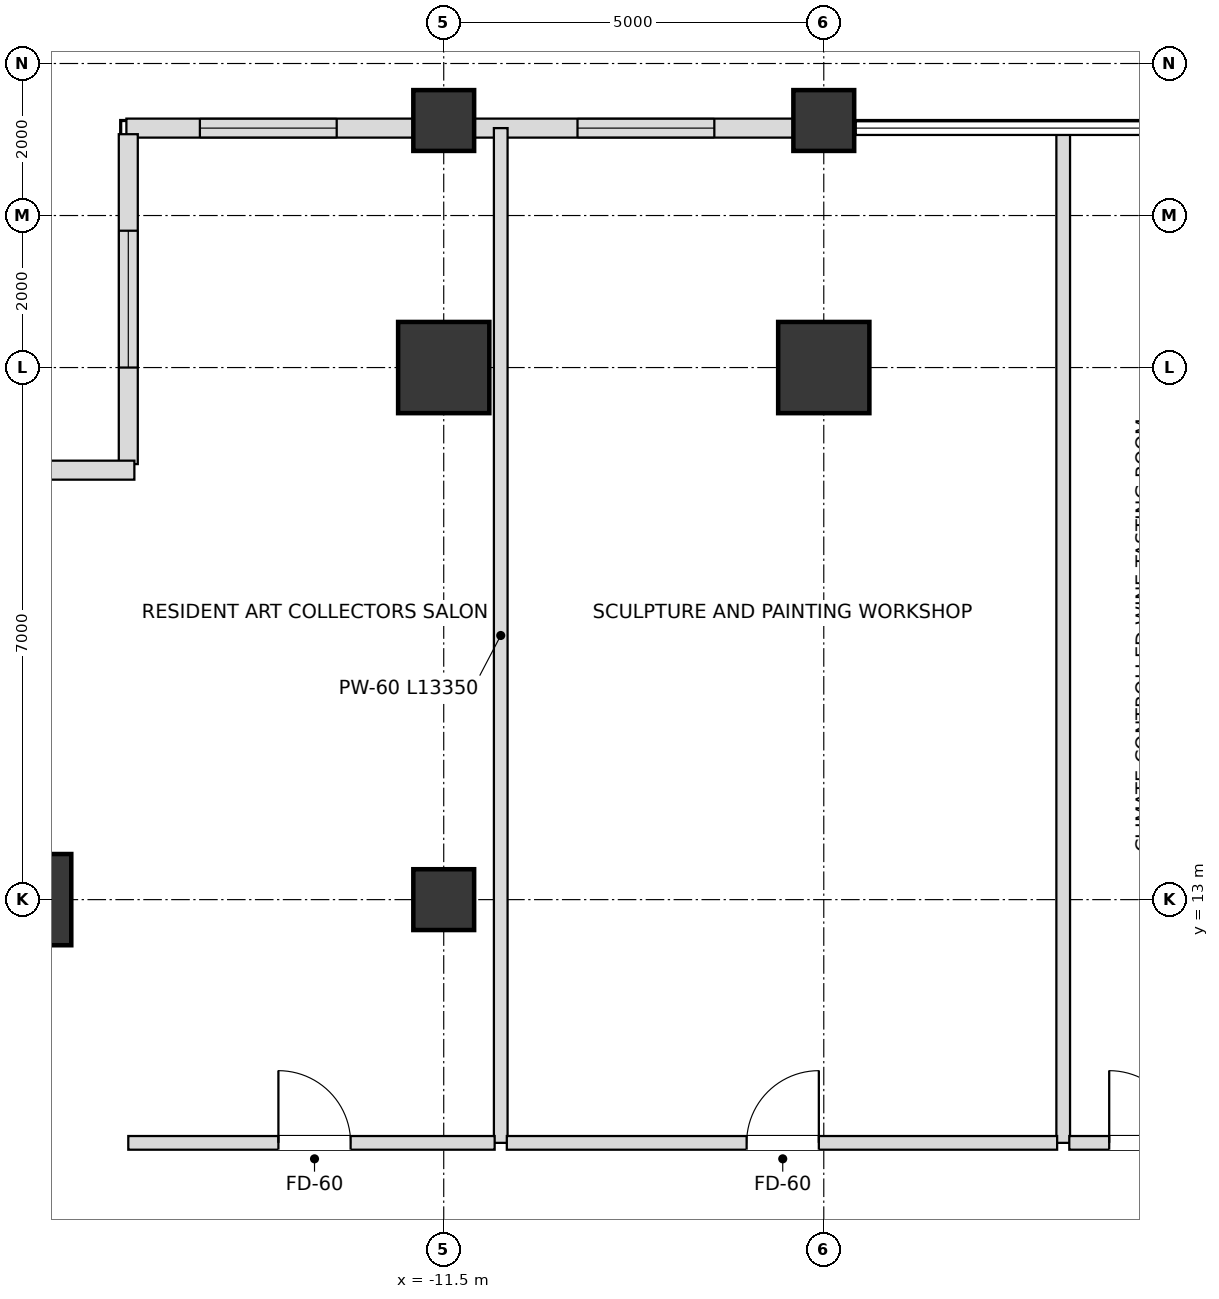
"""IFC4 building model, lengths in metres.
Left out: names, types, materials, properties, quantities, classifications, styles, units other than length and angle.
Written with IfcOpenShell. Run it as: python <this file> out.ifc"""

import sys

from ifc_helpers import new_model, si_unit, direction, frame, frame_2d, origin, origin_2d, place, context, subcontext, project, spatial, rectangle, extrude, element, fill, save


model = new_model("IFC4")
c1 = context("Model", 3, precision=1e-05, world=origin(), true_north=direction((0.0, 1.0)))
c2 = subcontext(c1, "Body", "Model", "MODEL_VIEW")
j1 = project(units=[si_unit("LENGTHUNIT", "METRE"), si_unit("PLANEANGLEUNIT", "RADIAN")], contexts=[c1])
p1 = place(None, origin())
s1 = spatial("IfcSite", under=j1, at=p1, CompositionType="ELEMENT")
p2 = place(p1, origin())
s2 = spatial("IfcBuilding", under=s1, at=p2, CompositionType="ELEMENT")
p3 = place(p2, frame((0.0, 0.0, 158.4)))
s3 = spatial("IfcBuildingStorey", under=s2, at=p3, CompositionType="ELEMENT", Elevation=158.4)
for number, where, z_axis, x_axis in (
    (1, (-6.5, 20.0, 0.0), (0.0, 0.0, 1.0), (1.0, 0.0, 0.0)),
    (2, (-11.5, 20.0, 0.0), (0.0, 0.0, 1.0), (1.0, 0.0, 0.0)),
    (3, (-17.0, 13.0, 0.0), (0.0, 0.0, 1.0), (1.0, 0.0, 0.0)),
):
    element("IfcColumn", number, at=place(p3, frame(where, z_axis=z_axis, x_axis=x_axis)), inside=s3, PredefinedType="USERDEFINED", context=c2, shape_type="SweptSolid", body=[
        extrude(rectangle(XDim=1.2, YDim=1.2, at=origin_2d()), origin(), (0.0, 0.0, 1.0), 3.6),
    ])
for number, where, z_axis, x_axis in (
    (4, (-11.5, 13.0, 0.0), (0.0, 0.0, 1.0), (1.0, 0.0, 0.0)),
    (5, (-11.5, 23.25, 0.0), (0.0, 0.0, 1.0), (1.0, 0.0, 0.0)),
    (6, (-6.5, 23.25, 0.0), (0.0, 0.0, 1.0), (1.0, 0.0, 0.0)),
):
    element("IfcColumn", number, at=place(p3, frame(where, z_axis=z_axis, x_axis=x_axis)), inside=s3, PredefinedType="COLUMN", context=c2, shape_type="SweptSolid", body=[
        extrude(rectangle(XDim=0.8, YDim=0.8, at=origin_2d()), origin(), (0.0, 0.0, 1.0), 3.6),
    ])
p4 = place(p3, frame((-6.895, 23.15, 0.0), z_axis=(0.0, 0.0, 1.0), x_axis=(-1.0, 0.0, 0.0)))
e7 = element("IfcWall", 7, at=p4, inside=s3, PredefinedType="SOLIDWALL", context=c2, shape_type="SweptSolid", body=[
    extrude(rectangle(XDim=4.21, YDim=0.25, at=frame_2d((2.105, 0.0))), origin(), (0.0, 0.0, 1.0), 2.736),
])
p5 = place(p4, frame((1.045, 0.0, 0.72)))
e8 = element("IfcOpeningElement", 8, at=p5, cuts=e7, PredefinedType="OPENING", context=c2, shape_type="SweptSolid", body=[
    extrude(rectangle(XDim=1.8, YDim=1.68, at=frame_2d((0.9, 0.84))), frame((0.0, 0.135, 0.0), z_axis=(0.0, -1.0, 0.0), x_axis=(1.0, 0.0, 0.0)), (0.0, 0.0, 1.0), 0.27),
])
p6 = place(p3, frame((-11.895, 23.15, 0.0), z_axis=(0.0, 0.0, 1.0), x_axis=(-1.0, 0.0, 0.0)))
e9 = element("IfcWall", 9, at=p6, inside=s3, PredefinedType="SOLIDWALL", context=c2, shape_type="SweptSolid", body=[
    extrude(rectangle(XDim=3.78, YDim=0.25, at=frame_2d((1.89, 0.0))), origin(), (0.0, 0.0, 1.0), 2.736),
])
p7 = place(p6, frame((1.013, 0.0, 0.72)))
e10 = element("IfcOpeningElement", 10, at=p7, cuts=e9, PredefinedType="OPENING", context=c2, shape_type="SweptSolid", body=[
    extrude(rectangle(XDim=1.8, YDim=1.68, at=frame_2d((0.9, 0.84))), frame((0.0, 0.135, 0.0), z_axis=(0.0, -1.0, 0.0), x_axis=(1.0, 0.0, 0.0)), (0.0, 0.0, 1.0), 0.27),
])
p8 = place(p3, frame((-15.65, 23.07, 0.0), z_axis=(0.0, 0.0, 1.0), x_axis=(0.0, -1.0, 0.0)))
e11 = element("IfcWall", 11, at=p8, inside=s3, PredefinedType="SOLIDWALL", context=c2, shape_type="SweptSolid", body=[
    extrude(rectangle(XDim=4.34, YDim=0.25, at=frame_2d((2.17, 0.0))), origin(), (0.0, 0.0, 1.0), 2.736),
])
p9 = place(p8, frame((1.27, 0.0, 0.72)))
e12 = element("IfcOpeningElement", 12, at=p9, cuts=e11, PredefinedType="OPENING", context=c2, shape_type="SweptSolid", body=[
    extrude(rectangle(XDim=1.8, YDim=1.68, at=frame_2d((0.9, 0.84))), frame((0.0, 0.135, 0.0), z_axis=(0.0, -1.0, 0.0), x_axis=(1.0, 0.0, 0.0)), (0.0, 0.0, 1.0), 0.27),
])
p10 = place(p3, frame((-15.57, 18.65, 0.0), z_axis=(0.0, 0.0, 1.0), x_axis=(-1.0, 0.0, 0.0)))
e13 = element("IfcWall", 13, at=p10, inside=s3, PredefinedType="SOLIDWALL", context=c2, shape_type="SweptSolid", body=[
    extrude(rectangle(XDim=4.66, YDim=0.25, at=frame_2d((2.33, 0.0))), origin(), (0.0, 0.0, 1.0), 2.736),
])
p11 = place(p10, frame((1.43, 0.0, 0.72)))
e14 = element("IfcOpeningElement", 14, at=p11, cuts=e13, PredefinedType="OPENING", context=c2, shape_type="SweptSolid", body=[
    extrude(rectangle(XDim=1.8, YDim=1.68, at=frame_2d((0.9, 0.84))), frame((0.0, 0.135, 0.0), z_axis=(0.0, -1.0, 0.0), x_axis=(1.0, 0.0, 0.0)), (0.0, 0.0, 1.0), 0.27),
])
for number, where, z_axis, x_axis in (
    (15, (-10.75, 9.8, 0.0), (0.0, 0.0, 1.0), (0.0, 1.0, 0.0)),
    (16, (-3.35, 9.8, 0.0), (0.0, 0.0, 1.0), (0.0, 1.0, 0.0)),
):
    element("IfcWall", number, at=place(p3, frame(where, z_axis=z_axis, x_axis=x_axis)), inside=s3, PredefinedType="PARTITIONING", context=c2, shape_type="SweptSolid", body=[
        extrude(rectangle(XDim=13.35, YDim=0.18, at=frame_2d((6.675, 0.0))), origin(), (0.0, 0.0, 1.0), 2.816),
    ])
p12 = place(p3, frame((-15.65, 9.8, 0.0), z_axis=(0.0, 0.0, 1.0), x_axis=(1.0, 0.0, 0.0)))
e17 = element("IfcWall", 17, at=p12, inside=s3, PredefinedType="PARTITIONING", context=c2, shape_type="SweptSolid", body=[
    extrude(rectangle(XDim=4.82, YDim=0.18, at=frame_2d((2.41, 0.0))), origin(), (0.0, 0.0, 1.0), 3.38),
])
p13 = place(p12, frame((1.975, 0.0, 0.0)))
e18 = element("IfcOpeningElement", 18, at=p13, cuts=e17, PredefinedType="OPENING", context=c2, shape_type="SweptSolid", body=[
    extrude(rectangle(XDim=0.95, YDim=2.15, at=frame_2d((0.475, 1.075))), frame((0.0, 0.1, 0.0), z_axis=(0.0, -1.0, 0.0), x_axis=(1.0, 0.0, 0.0)), (0.0, 0.0, 1.0), 0.2),
])
p14 = place(p3, frame((-10.67, 9.8, 0.0), z_axis=(0.0, 0.0, 1.0), x_axis=(1.0, 0.0, 0.0)))
e19 = element("IfcWall", 19, at=p14, inside=s3, PredefinedType="PARTITIONING", context=c2, shape_type="SweptSolid", body=[
    extrude(rectangle(XDim=7.24, YDim=0.18, at=frame_2d((3.62, 0.0))), origin(), (0.0, 0.0, 1.0), 2.816),
])
p15 = place(p14, frame((3.155, 0.0, 0.0)))
e20 = element("IfcOpeningElement", 20, at=p15, cuts=e19, PredefinedType="OPENING", context=c2, shape_type="SweptSolid", body=[
    extrude(rectangle(XDim=0.95, YDim=2.15, at=frame_2d((0.475, 1.075))), frame((0.0, 0.1, 0.0), z_axis=(0.0, -1.0, 0.0), x_axis=(1.0, 0.0, 0.0)), (0.0, 0.0, 1.0), 0.2),
])
p16 = place(p3, frame((-3.27, 9.8, 0.0), z_axis=(0.0, 0.0, 1.0), x_axis=(1.0, 0.0, 0.0)))
e21 = element("IfcWall", 21, at=p16, inside=s3, PredefinedType="PARTITIONING", context=c2, shape_type="SweptSolid", body=[
    extrude(rectangle(XDim=1.99, YDim=0.18, at=frame_2d((0.995, 0.0))), origin(), (0.0, 0.0, 1.0), 3.38),
])
p17 = place(p16, frame((0.525, 0.0, 0.0)))
e22 = element("IfcOpeningElement", 22, at=p17, cuts=e21, PredefinedType="OPENING", context=c2, shape_type="SweptSolid", body=[
    extrude(rectangle(XDim=0.95, YDim=2.15, at=frame_2d((0.475, 1.075))), frame((0.0, 0.1, 0.0), z_axis=(0.0, -1.0, 0.0), x_axis=(1.0, 0.0, 0.0)), (0.0, 0.0, 1.0), 0.2),
])
p18 = place(p5, origin())
e23 = element("IfcWindow", 23, at=p18, inside=s3, PartitioningType="SINGLE_PANEL", PredefinedType="WINDOW", context=c2, shape_type="SweptSolid", body=[
    extrude(rectangle(XDim=1.8, YDim=1.68, at=frame_2d((0.9, 0.84))), frame((0.0, 0.03, 0.0), z_axis=(0.0, -1.0, 0.0), x_axis=(1.0, 0.0, 0.0)), (0.0, 0.0, 1.0), 0.06),
])
fill(e8, e23)
p19 = place(p7, origin())
e24 = element("IfcWindow", 24, at=p19, inside=s3, PartitioningType="SINGLE_PANEL", PredefinedType="WINDOW", context=c2, shape_type="SweptSolid", body=[
    extrude(rectangle(XDim=1.8, YDim=1.68, at=frame_2d((0.9, 0.84))), frame((0.0, 0.03, 0.0), z_axis=(0.0, -1.0, 0.0), x_axis=(1.0, 0.0, 0.0)), (0.0, 0.0, 1.0), 0.06),
])
fill(e10, e24)
p20 = place(p9, origin())
e25 = element("IfcWindow", 25, at=p20, inside=s3, PartitioningType="SINGLE_PANEL", PredefinedType="WINDOW", context=c2, shape_type="SweptSolid", body=[
    extrude(rectangle(XDim=1.8, YDim=1.68, at=frame_2d((0.9, 0.84))), frame((0.0, 0.03, 0.0), z_axis=(0.0, -1.0, 0.0), x_axis=(1.0, 0.0, 0.0)), (0.0, 0.0, 1.0), 0.06),
])
fill(e12, e25)
p21 = place(p13, origin())
e26 = element("IfcDoor", 26, at=p21, inside=s3, OperationType="SINGLE_SWING_LEFT", PredefinedType="DOOR", context=c2, shape_type="SweptSolid", body=[
    extrude(rectangle(XDim=0.95, YDim=2.15, at=frame_2d((0.475, 1.075))), frame((0.0, 0.025, 0.0), z_axis=(0.0, -1.0, 0.0), x_axis=(1.0, 0.0, 0.0)), (0.0, 0.0, 1.0), 0.05),
])
fill(e18, e26)
p22 = place(p15, origin())
e27 = element("IfcDoor", 27, at=p22, inside=s3, OperationType="SINGLE_SWING_RIGHT", PredefinedType="DOOR", context=c2, shape_type="SweptSolid", body=[
    extrude(rectangle(XDim=0.95, YDim=2.15, at=frame_2d((0.475, 1.075))), frame((0.0, 0.025, 0.0), z_axis=(0.0, -1.0, 0.0), x_axis=(1.0, 0.0, 0.0)), (0.0, 0.0, 1.0), 0.05),
])
fill(e20, e27)
p23 = place(p17, origin())
e28 = element("IfcDoor", 28, at=p23, inside=s3, OperationType="SINGLE_SWING_LEFT", PredefinedType="DOOR", context=c2, shape_type="SweptSolid", body=[
    extrude(rectangle(XDim=0.95, YDim=2.15, at=frame_2d((0.475, 1.075))), frame((0.0, 0.025, 0.0), z_axis=(0.0, -1.0, 0.0), x_axis=(1.0, 0.0, 0.0)), (0.0, 0.0, 1.0), 0.05),
])
fill(e22, e28)
save(model, sys.argv[1])
